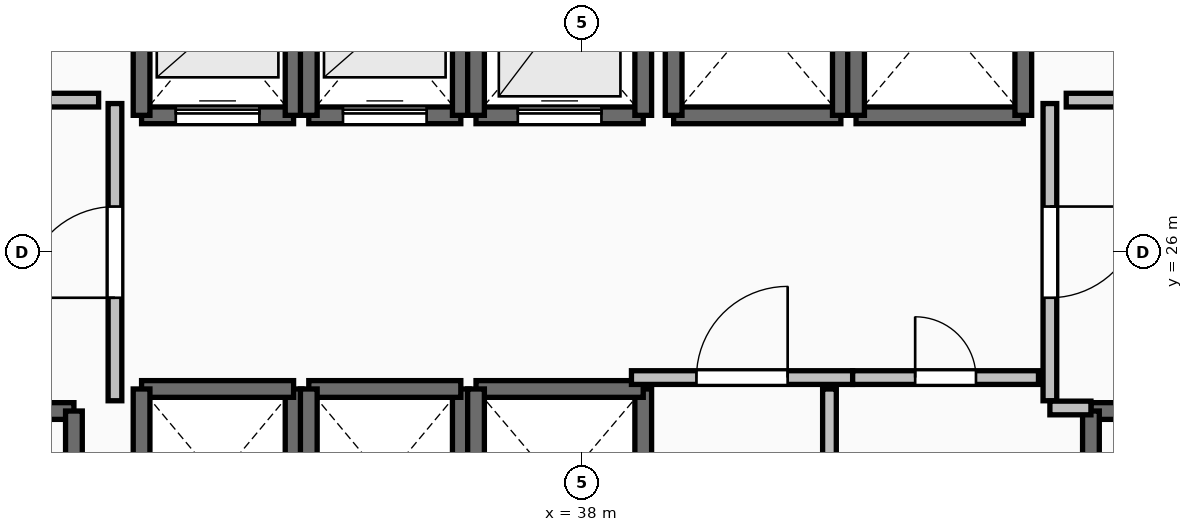
"""IFC4 building model, lengths in metres.
Left out: names, types, materials, properties, quantities, classifications, styles, units other than length and angle.
Written with IfcOpenShell. Run it as: python <this file> out.ifc"""

import sys

from ifc_helpers import new_model, si_unit, direction, frame, frame_2d, origin, place, context, subcontext, project, spatial, rectangle, extrude, element, fill, save


model = new_model("IFC4")
c1 = context("Model", 3, precision=1e-05, world=origin(), true_north=direction((0.0, 1.0)))
c2 = subcontext(c1, "Body", "Model", "MODEL_VIEW")
j1 = project(units=[si_unit("LENGTHUNIT", "METRE"), si_unit("PLANEANGLEUNIT", "RADIAN")], contexts=[c1])
p1 = place(None, origin())
s1 = spatial("IfcSite", under=j1, at=p1, CompositionType="ELEMENT")
p2 = place(p1, origin())
s2 = spatial("IfcBuilding", under=s1, at=p2, CompositionType="ELEMENT")
p3 = place(p2, frame((0.0, 0.0, 89.3)))
s3 = spatial("IfcBuildingStorey", under=s2, at=p3, CompositionType="ELEMENT", Elevation=89.3)
p4 = place(p3, frame((27.94, 23.91, 0.0), z_axis=(0.0, 0.0, 1.0), x_axis=(1.0, 0.0, 0.0)))
e1 = element("IfcWall", 1, at=p4, inside=s3, PredefinedType="SOLIDWALL", context=c2, shape_type="SweptSolid", body=[
    extrude(rectangle(XDim=3.37, YDim=0.22, at=frame_2d((1.685, 0.0))), origin(), (0.0, 0.0, 1.0), 3.24),
])
p5 = place(p4, frame((1.135, 0.0, 0.0)))
e2 = element("IfcOpeningElement", 2, at=p5, cuts=e1, PredefinedType="OPENING", context=c2, shape_type="SweptSolid", body=[
    extrude(rectangle(XDim=1.1, YDim=2.15, at=frame_2d((0.55, 1.075))), frame((0.0, 0.125, 0.0), z_axis=(0.0, -1.0, 0.0), x_axis=(1.0, 0.0, 0.0)), (0.0, 0.0, 1.0), 0.25),
])
p6 = place(p3, frame((31.31, 23.91, 0.0), z_axis=(0.0, 0.0, 1.0), x_axis=(0.0, -1.0, 0.0)))
e3 = element("IfcWall", 3, at=p6, inside=s3, PredefinedType="SOLIDWALL", context=c2, shape_type="SweptSolid", body=[
    extrude(rectangle(XDim=7.42, YDim=0.22, at=frame_2d((3.71, 0.0))), origin(), (0.0, 0.0, 1.0), 3.24),
])
p7 = place(p3, frame((44.69, 23.91, 0.0), z_axis=(0.0, 0.0, 1.0), x_axis=(1.0, 0.0, 0.0)))
e4 = element("IfcWall", 4, at=p7, inside=s3, PredefinedType="SOLIDWALL", context=c2, shape_type="SweptSolid", body=[
    extrude(rectangle(XDim=3.37, YDim=0.22, at=frame_2d((1.685, 0.0))), origin(), (0.0, 0.0, 1.0), 3.24),
])
p8 = place(p7, frame((1.135, 0.0, 0.0)))
e5 = element("IfcOpeningElement", 5, at=p8, cuts=e4, PredefinedType="OPENING", context=c2, shape_type="SweptSolid", body=[
    extrude(rectangle(XDim=1.1, YDim=2.15, at=frame_2d((0.55, 1.075))), frame((0.0, 0.125, 0.0), z_axis=(0.0, -1.0, 0.0), x_axis=(1.0, 0.0, 0.0)), (0.0, 0.0, 1.0), 0.25),
])
p9 = place(p3, frame((44.69, 16.49, 0.0), z_axis=(0.0, 0.0, 1.0), x_axis=(0.0, 1.0, 0.0)))
e6 = element("IfcWall", 6, at=p9, inside=s3, PredefinedType="SOLIDWALL", context=c2, shape_type="SweptSolid", body=[
    extrude(rectangle(XDim=7.42, YDim=0.22, at=frame_2d((3.71, 0.0))), origin(), (0.0, 0.0, 1.0), 3.24),
])
p10 = place(p3, frame((32.2, 27.8, 0.0), z_axis=(0.0, 0.0, 1.0), x_axis=(1.0, 0.0, 0.0)))
e7 = element("IfcWall", 7, at=p10, inside=s3, PredefinedType="SOLIDWALL", context=c2, shape_type="SweptSolid", body=[
    extrude(rectangle(XDim=2.0, YDim=0.22, at=frame_2d((1.0, 0.0))), origin(), (0.0, 0.0, 1.0), 3.24),
])
p11 = place(p10, frame((0.45, 0.0, 0.0)))
e8 = element("IfcOpeningElement", 8, at=p11, cuts=e7, PredefinedType="OPENING", context=c2, shape_type="SweptSolid", body=[
    extrude(rectangle(XDim=1.1, YDim=2.2, at=frame_2d((0.55, 1.1))), frame((0.0, 0.125, 0.0), z_axis=(0.0, -1.0, 0.0), x_axis=(1.0, 0.0, 0.0)), (0.0, 0.0, 1.0), 0.25),
])
for number, where, z_axis, x_axis in (
    (9, (34.2, 27.8, 0.0), (0.0, 0.0, 1.0), (0.0, 1.0, 0.0)),
    (10, (32.2, 30.2, 0.0), (0.0, 0.0, 1.0), (0.0, -1.0, 0.0)),
):
    element("IfcWall", number, at=place(p3, frame(where, z_axis=z_axis, x_axis=x_axis)), inside=s3, PredefinedType="SOLIDWALL", context=c2, shape_type="SweptSolid", body=[
        extrude(rectangle(XDim=2.4, YDim=0.22, at=frame_2d((1.2, 0.0))), origin(), (0.0, 0.0, 1.0), 3.24),
    ])
p12 = place(p3, frame((34.4, 27.8, 0.0), z_axis=(0.0, 0.0, 1.0), x_axis=(1.0, 0.0, 0.0)))
e11 = element("IfcWall", 11, at=p12, inside=s3, PredefinedType="SOLIDWALL", context=c2, shape_type="SweptSolid", body=[
    extrude(rectangle(XDim=2.0, YDim=0.22, at=frame_2d((1.0, 0.0))), origin(), (0.0, 0.0, 1.0), 3.24),
])
p13 = place(p12, frame((0.45, 0.0, 0.0)))
e12 = element("IfcOpeningElement", 12, at=p13, cuts=e11, PredefinedType="OPENING", context=c2, shape_type="SweptSolid", body=[
    extrude(rectangle(XDim=1.1, YDim=2.2, at=frame_2d((0.55, 1.1))), frame((0.0, 0.125, 0.0), z_axis=(0.0, -1.0, 0.0), x_axis=(1.0, 0.0, 0.0)), (0.0, 0.0, 1.0), 0.25),
])
for number, where, z_axis, x_axis in (
    (13, (36.4, 27.8, 0.0), (0.0, 0.0, 1.0), (0.0, 1.0, 0.0)),
    (14, (34.4, 30.2, 0.0), (0.0, 0.0, 1.0), (0.0, -1.0, 0.0)),
):
    element("IfcWall", number, at=place(p3, frame(where, z_axis=z_axis, x_axis=x_axis)), inside=s3, PredefinedType="SOLIDWALL", context=c2, shape_type="SweptSolid", body=[
        extrude(rectangle(XDim=2.4, YDim=0.22, at=frame_2d((1.2, 0.0))), origin(), (0.0, 0.0, 1.0), 3.24),
    ])
p14 = place(p3, frame((36.6, 27.8, 0.0), z_axis=(0.0, 0.0, 1.0), x_axis=(1.0, 0.0, 0.0)))
e15 = element("IfcWall", 15, at=p14, inside=s3, PredefinedType="SOLIDWALL", context=c2, shape_type="SweptSolid", body=[
    extrude(rectangle(XDim=2.2, YDim=0.22, at=frame_2d((1.1, 0.0))), origin(), (0.0, 0.0, 1.0), 3.24),
])
p15 = place(p14, frame((0.55, 0.0, 0.0)))
e16 = element("IfcOpeningElement", 16, at=p15, cuts=e15, PredefinedType="OPENING", context=c2, shape_type="SweptSolid", body=[
    extrude(rectangle(XDim=1.1, YDim=2.2, at=frame_2d((0.55, 1.1))), frame((0.0, 0.125, 0.0), z_axis=(0.0, -1.0, 0.0), x_axis=(1.0, 0.0, 0.0)), (0.0, 0.0, 1.0), 0.25),
])
for number, where, z_axis, x_axis in (
    (17, (38.8, 27.8, 0.0), (0.0, 0.0, 1.0), (0.0, 1.0, 0.0)),
    (18, (36.6, 30.4, 0.0), (0.0, 0.0, 1.0), (0.0, -1.0, 0.0)),
):
    element("IfcWall", number, at=place(p3, frame(where, z_axis=z_axis, x_axis=x_axis)), inside=s3, PredefinedType="SOLIDWALL", context=c2, shape_type="SweptSolid", body=[
        extrude(rectangle(XDim=2.6, YDim=0.22, at=frame_2d((1.3, 0.0))), origin(), (0.0, 0.0, 1.0), 3.24),
    ])
p16 = place(p3, frame((34.2, 21.8, 0.0), z_axis=(0.0, 0.0, 1.0), x_axis=(0.0, 1.0, 0.0)))
e19 = element("IfcWall", 19, at=p16, inside=s3, PredefinedType="SOLIDWALL", context=c2, shape_type="SweptSolid", body=[
    extrude(rectangle(XDim=2.4, YDim=0.22, at=frame_2d((1.2, 0.0))), origin(), (0.0, 0.0, 1.0), 3.24),
])
p17 = place(p3, frame((34.2, 24.2, 0.0), z_axis=(0.0, 0.0, 1.0), x_axis=(-1.0, 0.0, 0.0)))
e20 = element("IfcWall", 20, at=p17, inside=s3, PredefinedType="SOLIDWALL", context=c2, shape_type="SweptSolid", body=[
    extrude(rectangle(XDim=2.0, YDim=0.22, at=frame_2d((1.0, 0.0))), origin(), (0.0, 0.0, 1.0), 3.24),
])
for number, where, z_axis, x_axis in (
    (21, (32.2, 24.2, 0.0), (0.0, 0.0, 1.0), (0.0, -1.0, 0.0)),
    (22, (36.4, 21.8, 0.0), (0.0, 0.0, 1.0), (0.0, 1.0, 0.0)),
):
    element("IfcWall", number, at=place(p3, frame(where, z_axis=z_axis, x_axis=x_axis)), inside=s3, PredefinedType="SOLIDWALL", context=c2, shape_type="SweptSolid", body=[
        extrude(rectangle(XDim=2.4, YDim=0.22, at=frame_2d((1.2, 0.0))), origin(), (0.0, 0.0, 1.0), 3.24),
    ])
p18 = place(p3, frame((36.4, 24.2, 0.0), z_axis=(0.0, 0.0, 1.0), x_axis=(-1.0, 0.0, 0.0)))
e23 = element("IfcWall", 23, at=p18, inside=s3, PredefinedType="SOLIDWALL", context=c2, shape_type="SweptSolid", body=[
    extrude(rectangle(XDim=2.0, YDim=0.22, at=frame_2d((1.0, 0.0))), origin(), (0.0, 0.0, 1.0), 3.24),
])
p19 = place(p3, frame((34.4, 24.2, 0.0), z_axis=(0.0, 0.0, 1.0), x_axis=(0.0, -1.0, 0.0)))
e24 = element("IfcWall", 24, at=p19, inside=s3, PredefinedType="SOLIDWALL", context=c2, shape_type="SweptSolid", body=[
    extrude(rectangle(XDim=2.4, YDim=0.22, at=frame_2d((1.2, 0.0))), origin(), (0.0, 0.0, 1.0), 3.24),
])
p20 = place(p3, frame((38.8, 21.6, 0.0), z_axis=(0.0, 0.0, 1.0), x_axis=(0.0, 1.0, 0.0)))
e25 = element("IfcWall", 25, at=p20, inside=s3, PredefinedType="SOLIDWALL", context=c2, shape_type="SweptSolid", body=[
    extrude(rectangle(XDim=2.6, YDim=0.22, at=frame_2d((1.3, 0.0))), origin(), (0.0, 0.0, 1.0), 3.24),
])
p21 = place(p3, frame((38.8, 24.2, 0.0), z_axis=(0.0, 0.0, 1.0), x_axis=(-1.0, 0.0, 0.0)))
e26 = element("IfcWall", 26, at=p21, inside=s3, PredefinedType="SOLIDWALL", context=c2, shape_type="SweptSolid", body=[
    extrude(rectangle(XDim=2.2, YDim=0.22, at=frame_2d((1.1, 0.0))), origin(), (0.0, 0.0, 1.0), 3.24),
])
p22 = place(p3, frame((36.6, 24.2, 0.0), z_axis=(0.0, 0.0, 1.0), x_axis=(0.0, -1.0, 0.0)))
e27 = element("IfcWall", 27, at=p22, inside=s3, PredefinedType="SOLIDWALL", context=c2, shape_type="SweptSolid", body=[
    extrude(rectangle(XDim=2.6, YDim=0.22, at=frame_2d((1.3, 0.0))), origin(), (0.0, 0.0, 1.0), 3.24),
])
p23 = place(p3, frame((39.2, 27.8, 0.0), z_axis=(0.0, 0.0, 1.0), x_axis=(1.0, 0.0, 0.0)))
e28 = element("IfcWall", 28, at=p23, inside=s3, PredefinedType="SOLIDWALL", context=c2, shape_type="SweptSolid", body=[
    extrude(rectangle(XDim=2.2, YDim=0.22, at=frame_2d((1.1, 0.0))), origin(), (0.0, 0.0, 1.0), 3.24),
])
for number, where, z_axis, x_axis in (
    (29, (41.4, 27.8, 0.0), (0.0, 0.0, 1.0), (0.0, 1.0, 0.0)),
    (30, (39.2, 30.4, 0.0), (0.0, 0.0, 1.0), (0.0, -1.0, 0.0)),
):
    element("IfcWall", number, at=place(p3, frame(where, z_axis=z_axis, x_axis=x_axis)), inside=s3, PredefinedType="SOLIDWALL", context=c2, shape_type="SweptSolid", body=[
        extrude(rectangle(XDim=2.6, YDim=0.22, at=frame_2d((1.3, 0.0))), origin(), (0.0, 0.0, 1.0), 3.24),
    ])
p24 = place(p3, frame((41.6, 27.8, 0.0), z_axis=(0.0, 0.0, 1.0), x_axis=(1.0, 0.0, 0.0)))
e31 = element("IfcWall", 31, at=p24, inside=s3, PredefinedType="SOLIDWALL", context=c2, shape_type="SweptSolid", body=[
    extrude(rectangle(XDim=2.2, YDim=0.22, at=frame_2d((1.1, 0.0))), origin(), (0.0, 0.0, 1.0), 3.24),
])
for number, where, z_axis, x_axis in (
    (32, (43.8, 27.8, 0.0), (0.0, 0.0, 1.0), (0.0, 1.0, 0.0)),
    (33, (41.6, 30.4, 0.0), (0.0, 0.0, 1.0), (0.0, -1.0, 0.0)),
):
    element("IfcWall", number, at=place(p3, frame(where, z_axis=z_axis, x_axis=x_axis)), inside=s3, PredefinedType="SOLIDWALL", context=c2, shape_type="SweptSolid", body=[
        extrude(rectangle(XDim=2.6, YDim=0.22, at=frame_2d((1.3, 0.0))), origin(), (0.0, 0.0, 1.0), 3.24),
    ])
p25 = place(p3, frame((31.85, 24.045, 0.0), z_axis=(0.0, 0.0, 1.0), x_axis=(0.0, 1.0, 0.0)))
e34 = element("IfcWall", 34, at=p25, inside=s3, PredefinedType="PARTITIONING", context=c2, shape_type="SweptSolid", body=[
    extrude(rectangle(XDim=3.91, YDim=0.18, at=frame_2d((1.955, 0.0))), origin(), (0.0, 0.0, 1.0), 3.24),
])
p26 = place(p25, frame((1.355, 0.0, 0.0)))
e35 = element("IfcOpeningElement", 35, at=p26, cuts=e34, PredefinedType="OPENING", context=c2, shape_type="SweptSolid", body=[
    extrude(rectangle(XDim=1.2, YDim=2.15, at=frame_2d((0.6, 1.075))), frame((0.0, 0.105, 0.0), z_axis=(0.0, -1.0, 0.0), x_axis=(1.0, 0.0, 0.0)), (0.0, 0.0, 1.0), 0.21),
])
p27 = place(p3, frame((44.15, 27.955, 0.0), z_axis=(0.0, 0.0, 1.0), x_axis=(0.0, -1.0, 0.0)))
e36 = element("IfcWall", 36, at=p27, inside=s3, PredefinedType="PARTITIONING", context=c2, shape_type="SweptSolid", body=[
    extrude(rectangle(XDim=3.91, YDim=0.18, at=frame_2d((1.955, 0.0))), origin(), (0.0, 0.0, 1.0), 3.24),
])
p28 = place(p27, frame((1.355, 0.0, 0.0)))
e37 = element("IfcOpeningElement", 37, at=p28, cuts=e36, PredefinedType="OPENING", context=c2, shape_type="SweptSolid", body=[
    extrude(rectangle(XDim=1.2, YDim=2.15, at=frame_2d((0.6, 1.075))), frame((0.0, 0.105, 0.0), z_axis=(0.0, -1.0, 0.0), x_axis=(1.0, 0.0, 0.0)), (0.0, 0.0, 1.0), 0.21),
])
p29 = place(p3, frame((44.15, 23.95, 0.0), z_axis=(0.0, 0.0, 1.0), x_axis=(1.0, 0.0, 0.0)))
e38 = element("IfcWall", 38, at=p29, inside=s3, PredefinedType="PARTITIONING", context=c2, shape_type="SweptSolid", body=[
    extrude(rectangle(XDim=0.54, YDim=0.18, at=frame_2d((0.27, 0.0))), origin(), (0.0, 0.0, 1.0), 3.24),
])
p30 = place(p3, frame((38.645, 24.35, 0.0), z_axis=(0.0, 0.0, 1.0), x_axis=(1.0, 0.0, 0.0)))
e39 = element("IfcWall", 39, at=p30, inside=s3, PredefinedType="PARTITIONING", context=c2, shape_type="SweptSolid", body=[
    extrude(rectangle(XDim=2.91, YDim=0.18, at=frame_2d((1.455, 0.0))), origin(), (0.0, 0.0, 1.0), 3.24),
])
p31 = place(p30, frame((0.855, 0.0, 0.0)))
e40 = element("IfcOpeningElement", 40, at=p31, cuts=e39, PredefinedType="OPENING", context=c2, shape_type="SweptSolid", body=[
    extrude(rectangle(XDim=1.2, YDim=2.15, at=frame_2d((0.6, 1.075))), frame((0.0, 0.105, 0.0), z_axis=(0.0, -1.0, 0.0), x_axis=(1.0, 0.0, 0.0)), (0.0, 0.0, 1.0), 0.21),
])
p32 = place(p3, frame((41.555, 24.35, 0.0), z_axis=(0.0, 0.0, 1.0), x_axis=(1.0, 0.0, 0.0)))
e41 = element("IfcWall", 41, at=p32, inside=s3, PredefinedType="PARTITIONING", context=c2, shape_type="SweptSolid", body=[
    extrude(rectangle(XDim=2.445, YDim=0.18, at=frame_2d((1.223, 0.0))), origin(), (0.0, 0.0, 1.0), 3.24),
])
p33 = place(p32, frame((0.823, 0.0, 0.0)))
e42 = element("IfcOpeningElement", 42, at=p33, cuts=e41, PredefinedType="OPENING", context=c2, shape_type="SweptSolid", body=[
    extrude(rectangle(XDim=0.8, YDim=2.05, at=frame_2d((0.4, 1.025))), frame((0.0, 0.105, 0.0), z_axis=(0.0, -1.0, 0.0), x_axis=(1.0, 0.0, 0.0)), (0.0, 0.0, 1.0), 0.21),
])
p34 = place(p3, frame((41.25, 16.32, 0.0), z_axis=(0.0, 0.0, 1.0), x_axis=(0.0, 1.0, 0.0)))
e43 = element("IfcWall", 43, at=p34, inside=s3, PredefinedType="PARTITIONING", context=c2, shape_type="SweptSolid", body=[
    extrude(rectangle(XDim=7.88, YDim=0.18, at=frame_2d((3.94, 0.0))), origin(), (0.0, 0.0, 1.0), 3.24),
])
p35 = place(p34, frame((3.54, 0.0, 0.0)))
e44 = element("IfcOpeningElement", 44, at=p35, cuts=e43, PredefinedType="OPENING", context=c2, shape_type="SweptSolid", body=[
    extrude(rectangle(XDim=0.8, YDim=2.05, at=frame_2d((0.4, 1.025))), frame((0.0, 0.105, 0.0), z_axis=(0.0, -1.0, 0.0), x_axis=(1.0, 0.0, 0.0)), (0.0, 0.0, 1.0), 0.21),
])
for number, where, z_axis, x_axis in (
    (45, (31.635, 28.0, 0.0), (0.0, 0.0, 1.0), (-1.0, 0.0, 0.0)),
    (46, (45.28, 28.0, 0.0), (0.0, 0.0, 1.0), (-1.0, 0.0, 0.0)),
):
    element("IfcWall", number, at=place(p3, frame(where, z_axis=z_axis, x_axis=x_axis)), inside=s3, PredefinedType="PARTITIONING", context=c2, shape_type="SweptSolid", body=[
        extrude(rectangle(XDim=0.915, YDim=0.18, at=frame_2d((0.458, 0.0))), origin(), (0.0, 0.0, 1.0), 3.24),
    ])
p36 = place(p11, origin())
e47 = element("IfcDoor", 47, at=p36, inside=s3, OperationType="SLIDING_TO_LEFT", PredefinedType="DOOR", context=c2, shape_type="SweptSolid", body=[
    extrude(rectangle(XDim=1.1, YDim=2.2, at=frame_2d((0.55, 1.1))), frame((0.0, 0.025, 0.0), z_axis=(0.0, -1.0, 0.0), x_axis=(1.0, 0.0, 0.0)), (0.0, 0.0, 1.0), 0.05),
])
fill(e8, e47)
p37 = place(p13, origin())
e48 = element("IfcDoor", 48, at=p37, inside=s3, OperationType="SLIDING_TO_LEFT", PredefinedType="DOOR", context=c2, shape_type="SweptSolid", body=[
    extrude(rectangle(XDim=1.1, YDim=2.2, at=frame_2d((0.55, 1.1))), frame((0.0, 0.025, 0.0), z_axis=(0.0, -1.0, 0.0), x_axis=(1.0, 0.0, 0.0)), (0.0, 0.0, 1.0), 0.05),
])
fill(e12, e48)
p38 = place(p15, origin())
e49 = element("IfcDoor", 49, at=p38, inside=s3, OperationType="SLIDING_TO_LEFT", PredefinedType="DOOR", context=c2, shape_type="SweptSolid", body=[
    extrude(rectangle(XDim=1.1, YDim=2.2, at=frame_2d((0.55, 1.1))), frame((0.0, 0.025, 0.0), z_axis=(0.0, -1.0, 0.0), x_axis=(1.0, 0.0, 0.0)), (0.0, 0.0, 1.0), 0.05),
])
fill(e16, e49)
p39 = place(p26, origin())
e50 = element("IfcDoor", 50, at=p39, inside=s3, OperationType="SINGLE_SWING_LEFT", PredefinedType="DOOR", context=c2, shape_type="SweptSolid", body=[
    extrude(rectangle(XDim=1.2, YDim=2.15, at=frame_2d((0.6, 1.075))), frame((0.0, 0.025, 0.0), z_axis=(0.0, -1.0, 0.0), x_axis=(1.0, 0.0, 0.0)), (0.0, 0.0, 1.0), 0.05),
])
fill(e35, e50)
p40 = place(p28, origin())
e51 = element("IfcDoor", 51, at=p40, inside=s3, OperationType="SINGLE_SWING_LEFT", PredefinedType="DOOR", context=c2, shape_type="SweptSolid", body=[
    extrude(rectangle(XDim=1.2, YDim=2.15, at=frame_2d((0.6, 1.075))), frame((0.0, 0.025, 0.0), z_axis=(0.0, -1.0, 0.0), x_axis=(1.0, 0.0, 0.0)), (0.0, 0.0, 1.0), 0.05),
])
fill(e37, e51)
p41 = place(p31, origin())
e52 = element("IfcDoor", 52, at=p41, inside=s3, OperationType="SINGLE_SWING_RIGHT", PredefinedType="DOOR", context=c2, shape_type="SweptSolid", body=[
    extrude(rectangle(XDim=1.2, YDim=2.15, at=frame_2d((0.6, 1.075))), frame((0.0, 0.025, 0.0), z_axis=(0.0, -1.0, 0.0), x_axis=(1.0, 0.0, 0.0)), (0.0, 0.0, 1.0), 0.05),
])
fill(e40, e52)
p42 = place(p33, origin())
e53 = element("IfcDoor", 53, at=p42, inside=s3, OperationType="SINGLE_SWING_LEFT", PredefinedType="DOOR", context=c2, shape_type="SweptSolid", body=[
    extrude(rectangle(XDim=0.8, YDim=2.05, at=frame_2d((0.4, 1.025))), frame((0.0, 0.025, 0.0), z_axis=(0.0, -1.0, 0.0), x_axis=(1.0, 0.0, 0.0)), (0.0, 0.0, 1.0), 0.05),
])
fill(e42, e53)
save(model, sys.argv[1])
